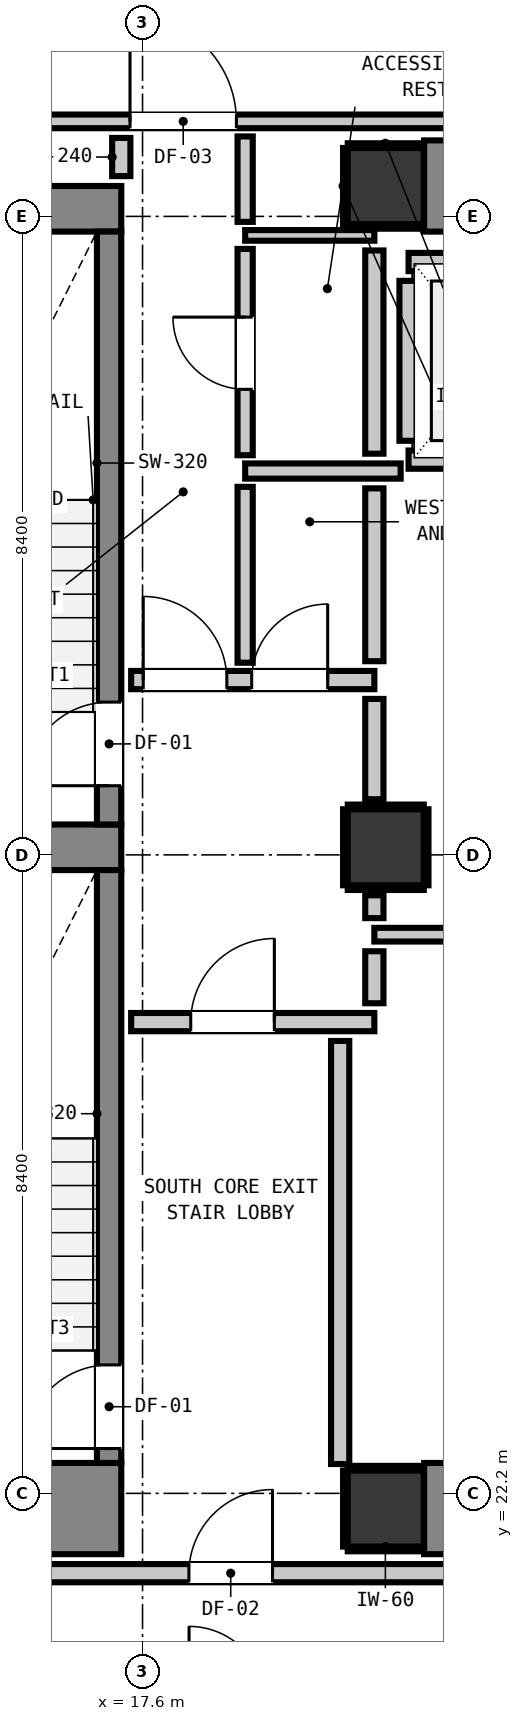
"""IFC4 building model, lengths in metres.
Left out: names, types, materials, properties, quantities, classifications, styles, units other than length and angle.
Written with IfcOpenShell. Run it as: python <this file> out.ifc"""

import sys

from ifc_helpers import new_model, si_unit, direction, frame, frame_2d, origin, origin_2d, place, context, subcontext, project, spatial, rectangle, extrude, element, fill, save


model = new_model("IFC4")
c1 = context("Model", 3, precision=1e-05, world=origin(), true_north=direction((0.0, 1.0)))
c2 = subcontext(c1, "Body", "Model", "MODEL_VIEW")
j1 = project(units=[si_unit("LENGTHUNIT", "METRE"), si_unit("PLANEANGLEUNIT", "RADIAN")], contexts=[c1])
p1 = place(None, origin())
s1 = spatial("IfcSite", under=j1, at=p1, CompositionType="ELEMENT")
p2 = place(p1, origin())
s2 = spatial("IfcBuilding", under=s1, at=p2, CompositionType="ELEMENT")
p3 = place(p2, frame((0.0, 0.0, 78.44)))
s3 = spatial("IfcBuildingStorey", under=s2, at=p3, CompositionType="ELEMENT", Elevation=78.44)
for number, where, z_axis, x_axis in (
    (1, (20.8, 22.0, 0.0), (0.0, 0.0, 1.0), (1.0, 0.0, 0.0)),
    (2, (20.8, 39.4, 0.0), (0.0, 0.0, 1.0), (1.0, 0.0, 0.0)),
):
    element("IfcColumn", number, at=place(p3, frame(where, z_axis=z_axis, x_axis=x_axis)), inside=s3, PredefinedType="COLUMN", context=c2, shape_type="SweptSolid", body=[
        extrude(rectangle(XDim=1.0, YDim=1.0, at=origin_2d()), origin(), (0.0, 0.0, 1.0), 3.32),
    ])
p4 = place(p3, frame((13.24, 22.0, 0.0), z_axis=(0.0, 0.0, 1.0), x_axis=(1.0, 0.0, 0.0)))
e3 = element("IfcWall", 3, at=p4, inside=s3, PredefinedType="SHEAR", context=c2, shape_type="SweptSolid", body=[
    extrude(rectangle(XDim=4.08, YDim=1.2, at=frame_2d((2.04, 0.0))), origin(), (0.0, 0.0, 1.0), 3.32),
])
p5 = place(p3, frame((13.24, 39.1, 0.0), z_axis=(0.0, 0.0, 1.0), x_axis=(1.0, 0.0, 0.0)))
e4 = element("IfcWall", 4, at=p5, inside=s3, PredefinedType="SHEAR", context=c2, shape_type="SweptSolid", body=[
    extrude(rectangle(XDim=4.08, YDim=0.6, at=frame_2d((2.04, 0.0))), origin(), (0.0, 0.0, 1.0), 3.32),
])
p6 = place(p3, frame((13.905, 30.7, 0.0), z_axis=(0.0, 0.0, 1.0), x_axis=(1.0, 0.0, 0.0)))
e5 = element("IfcWall", 5, at=p6, inside=s3, PredefinedType="SHEAR", context=c2, shape_type="SweptSolid", body=[
    extrude(rectangle(XDim=3.415, YDim=0.6, at=frame_2d((1.708, 0.0))), origin(), (0.0, 0.0, 1.0), 3.32),
])
for number, where, z_axis, x_axis in (
    (6, (21.305, 22.0, 0.0), (0.0, 0.0, 1.0), (1.0, 0.0, 0.0)),
    (7, (21.305, 39.4, 0.0), (0.0, 0.0, 1.0), (1.0, 0.0, 0.0)),
):
    element("IfcWall", number, at=place(p3, frame(where, z_axis=z_axis, x_axis=x_axis)), inside=s3, PredefinedType="SHEAR", context=c2, shape_type="SweptSolid", body=[
        extrude(rectangle(XDim=7.39, YDim=1.2, at=frame_2d((3.695, 0.0))), origin(), (0.0, 0.0, 1.0), 3.32),
    ])
p7 = place(p3, frame((17.16, 31.0, 0.0), z_axis=(0.0, 0.0, 1.0), x_axis=(0.0, 1.0, 0.0)))
e8 = element("IfcWall", 8, at=p7, inside=s3, PredefinedType="SHEAR", context=c2, shape_type="SweptSolid", body=[
    extrude(rectangle(XDim=7.8, YDim=0.32, at=frame_2d((3.9, 0.0))), origin(), (0.0, 0.0, 1.0), 3.32),
])
p8 = place(p7, frame((0.51, 0.0, 0.0)))
e9 = element("IfcOpeningElement", 9, at=p8, cuts=e8, PredefinedType="OPENING", context=c2, shape_type="SweptSolid", body=[
    extrude(rectangle(XDim=1.1, YDim=2.15, at=frame_2d((0.55, 1.075))), frame((0.0, 0.17, 0.0), z_axis=(0.0, -1.0, 0.0), x_axis=(1.0, 0.0, 0.0)), (0.0, 0.0, 1.0), 0.34),
])
p9 = place(p3, frame((17.16, 22.6, 0.0), z_axis=(0.0, 0.0, 1.0), x_axis=(0.0, 1.0, 0.0)))
e10 = element("IfcWall", 10, at=p9, inside=s3, PredefinedType="SHEAR", context=c2, shape_type="SweptSolid", body=[
    extrude(rectangle(XDim=7.8, YDim=0.32, at=frame_2d((3.9, 0.0))), origin(), (0.0, 0.0, 1.0), 3.32),
])
p10 = place(p9, frame((0.19, 0.0, 0.0)))
e11 = element("IfcOpeningElement", 11, at=p10, cuts=e10, PredefinedType="OPENING", context=c2, shape_type="SweptSolid", body=[
    extrude(rectangle(XDim=1.1, YDim=2.15, at=frame_2d((0.55, 1.075))), frame((0.0, 0.17, 0.0), z_axis=(0.0, -1.0, 0.0), x_axis=(1.0, 0.0, 0.0)), (0.0, 0.0, 1.0), 0.34),
])
p11 = place(p3, frame((20.8, 30.7, 0.0), z_axis=(0.0, 0.0, 1.0), x_axis=(1.0, 0.0, 0.0)))
e12 = element("IfcColumn", 12, at=p11, inside=s3, PredefinedType="COLUMN", context=c2, shape_type="SweptSolid", body=[
    extrude(rectangle(XDim=1.0, YDim=1.0, at=origin_2d()), origin(), (0.0, 0.0, 1.0), 3.32),
])
for number, where, z_axis, x_axis in (
    (13, (21.1, 35.8, 0.0), (0.0, 0.0, 1.0), (1.0, 0.0, 0.0)),
    (14, (21.1, 38.4, 0.0), (0.0, 0.0, 1.0), (1.0, 0.0, 0.0)),
):
    element("IfcWall", number, at=place(p3, frame(where, z_axis=z_axis, x_axis=x_axis)), inside=s3, PredefinedType="PARTITIONING", context=c2, shape_type="SweptSolid", body=[
        extrude(rectangle(XDim=2.2, YDim=0.24, at=frame_2d((1.1, 0.0))), origin(), (0.0, 0.0, 1.0), 2.9),
    ])
p12 = place(p3, frame((21.1, 36.048, 0.0), z_axis=(0.0, 0.0, 1.0), x_axis=(0.0, 1.0, 0.0)))
e15 = element("IfcWall", 15, at=p12, inside=s3, PredefinedType="PARTITIONING", context=c2, shape_type="SweptSolid", body=[
    extrude(rectangle(XDim=2.104, YDim=0.24, at=frame_2d((1.052, 0.0))), origin(), (0.0, 0.0, 1.0), 0.905),
])
p13 = place(p3, frame((8.027, 21.15, 0.0), z_axis=(0.0, 0.0, 1.0), x_axis=(1.0, 0.0, 0.0)))
e16 = element("IfcWall", 16, at=p13, inside=s3, PredefinedType="PARTITIONING", context=c2, shape_type="SweptSolid", body=[
    extrude(rectangle(XDim=42.146, YDim=0.24, at=frame_2d((21.073, 0.0))), origin(), (0.0, 0.0, 1.0), 2.9),
])
p14 = place(p13, frame((10.183, 0.0, 0.0)))
e17 = element("IfcOpeningElement", 17, at=p14, cuts=e16, PredefinedType="OPENING", context=c2, shape_type="SweptSolid", body=[
    extrude(rectangle(XDim=1.1, YDim=2.15, at=frame_2d((0.55, 1.075))), frame((0.0, 0.13, 0.0), z_axis=(0.0, -1.0, 0.0), x_axis=(1.0, 0.0, 0.0)), (0.0, 0.0, 1.0), 0.26),
])
p15 = place(p13, frame((2.447, 0.0, 0.0)))
e18 = element("IfcOpeningElement", 18, at=p15, cuts=e16, PredefinedType="OPENING", context=c2, shape_type="SweptSolid", body=[
    extrude(rectangle(XDim=1.4, YDim=2.15, at=frame_2d((0.7, 1.075))), frame((0.0, 0.13, 0.0), z_axis=(0.0, -1.0, 0.0), x_axis=(1.0, 0.0, 0.0)), (0.0, 0.0, 1.0), 0.26),
])
p16 = place(p13, frame((33.948, 0.0, 0.0)))
e19 = element("IfcOpeningElement", 19, at=p16, cuts=e16, PredefinedType="OPENING", context=c2, shape_type="SweptSolid", body=[
    extrude(rectangle(XDim=1.0, YDim=2.15, at=frame_2d((0.5, 1.075))), frame((0.0, 0.13, 0.0), z_axis=(0.0, -1.0, 0.0), x_axis=(1.0, 0.0, 0.0)), (0.0, 0.0, 1.0), 0.26),
])
p17 = place(p3, frame((17.45, 28.4, 0.0), z_axis=(0.0, 0.0, 1.0), x_axis=(1.0, 0.0, 0.0)))
e20 = element("IfcWall", 20, at=p17, inside=s3, PredefinedType="PARTITIONING", context=c2, shape_type="SweptSolid", body=[
    extrude(rectangle(XDim=3.2, YDim=0.24, at=frame_2d((1.6, 0.0))), origin(), (0.0, 0.0, 1.0), 2.9),
])
p18 = place(p17, frame((0.784, 0.0, 0.0)))
e21 = element("IfcOpeningElement", 21, at=p18, cuts=e20, PredefinedType="OPENING", context=c2, shape_type="SweptSolid", body=[
    extrude(rectangle(XDim=1.1, YDim=2.15, at=frame_2d((0.55, 1.075))), frame((0.0, 0.13, 0.0), z_axis=(0.0, -1.0, 0.0), x_axis=(1.0, 0.0, 0.0)), (0.0, 0.0, 1.0), 0.26),
])
p19 = place(p3, frame((17.45, 32.9, 0.0), z_axis=(0.0, 0.0, 1.0), x_axis=(1.0, 0.0, 0.0)))
e22 = element("IfcWall", 22, at=p19, inside=s3, PredefinedType="PARTITIONING", context=c2, shape_type="SweptSolid", body=[
    extrude(rectangle(XDim=3.2, YDim=0.24, at=frame_2d((1.6, 0.0))), origin(), (0.0, 0.0, 1.0), 2.9),
])
p20 = place(p19, frame((0.159, 0.0, 0.0)))
e23 = element("IfcOpeningElement", 23, at=p20, cuts=e22, PredefinedType="OPENING", context=c2, shape_type="SweptSolid", body=[
    extrude(rectangle(XDim=1.1, YDim=2.15, at=frame_2d((0.55, 1.075))), frame((0.0, 0.13, 0.0), z_axis=(0.0, -1.0, 0.0), x_axis=(1.0, 0.0, 0.0)), (0.0, 0.0, 1.0), 0.26),
])
p21 = place(p19, frame((1.586, 0.0, 0.0)))
e24 = element("IfcOpeningElement", 24, at=p21, cuts=e22, PredefinedType="OPENING", context=c2, shape_type="SweptSolid", body=[
    extrude(rectangle(XDim=1.0, YDim=2.15, at=frame_2d((0.5, 1.075))), frame((0.0, 0.13, 0.0), z_axis=(0.0, -1.0, 0.0), x_axis=(1.0, 0.0, 0.0)), (0.0, 0.0, 1.0), 0.26),
])
p22 = place(p3, frame((18.95, 35.65, 0.0), z_axis=(0.0, 0.0, 1.0), x_axis=(1.0, 0.0, 0.0)))
e25 = element("IfcWall", 25, at=p22, inside=s3, PredefinedType="PARTITIONING", context=c2, shape_type="SweptSolid", body=[
    extrude(rectangle(XDim=2.046, YDim=0.2, at=frame_2d((1.023, 0.0))), origin(), (0.0, 0.0, 1.0), 2.9),
])
p23 = place(p3, frame((20.65, 29.55, 0.0), z_axis=(0.0, 0.0, 1.0), x_axis=(1.0, 0.0, 0.0)))
e26 = element("IfcWall", 26, at=p23, inside=s3, PredefinedType="PARTITIONING", context=c2, shape_type="SweptSolid", body=[
    extrude(rectangle(XDim=9.325, YDim=0.18, at=frame_2d((4.663, 0.0))), origin(), (0.0, 0.0, 1.0), 2.9),
])
p24 = place(p3, frame((8.027, 40.25, 0.0), z_axis=(0.0, 0.0, 1.0), x_axis=(1.0, 0.0, 0.0)))
e27 = element("IfcWall", 27, at=p24, inside=s3, PredefinedType="PARTITIONING", context=c2, shape_type="SweptSolid", body=[
    extrude(rectangle(XDim=42.146, YDim=0.18, at=frame_2d((21.073, 0.0))), origin(), (0.0, 0.0, 1.0), 2.9),
])
p25 = place(p24, frame((9.408, 0.0, 0.0)))
e28 = element("IfcOpeningElement", 28, at=p25, cuts=e27, PredefinedType="OPENING", context=c2, shape_type="SweptSolid", body=[
    extrude(rectangle(XDim=1.4, YDim=2.15, at=frame_2d((0.7, 1.075))), frame((0.0, 0.1, 0.0), z_axis=(0.0, -1.0, 0.0), x_axis=(1.0, 0.0, 0.0)), (0.0, 0.0, 1.0), 0.2),
])
p26 = place(p24, frame((2.447, 0.0, 0.0)))
e29 = element("IfcOpeningElement", 29, at=p26, cuts=e27, PredefinedType="OPENING", context=c2, shape_type="SweptSolid", body=[
    extrude(rectangle(XDim=1.4, YDim=2.15, at=frame_2d((0.7, 1.075))), frame((0.0, 0.1, 0.0), z_axis=(0.0, -1.0, 0.0), x_axis=(1.0, 0.0, 0.0)), (0.0, 0.0, 1.0), 0.2),
])
p27 = place(p24, frame((35.474, 0.0, 0.0)))
e30 = element("IfcOpeningElement", 30, at=p27, cuts=e27, PredefinedType="OPENING", context=c2, shape_type="SweptSolid", body=[
    extrude(rectangle(XDim=0.9, YDim=2.1, at=frame_2d((0.45, 1.05))), frame((0.0, 0.1, 0.0), z_axis=(0.0, -1.0, 0.0), x_axis=(1.0, 0.0, 0.0)), (0.0, 0.0, 1.0), 0.2),
])
p28 = place(p3, frame((18.95, 38.75, 0.0), z_axis=(0.0, 0.0, 1.0), x_axis=(1.0, 0.0, 0.0)))
e31 = element("IfcWall", 31, at=p28, inside=s3, PredefinedType="PARTITIONING", context=c2, shape_type="SweptSolid", body=[
    extrude(rectangle(XDim=1.7, YDim=0.14, at=frame_2d((0.85, 0.0))), origin(), (0.0, 0.0, 1.0), 0.905),
])
p29 = place(p3, frame((17.32, 39.53, 0.0), z_axis=(0.0, 0.0, 1.0), x_axis=(0.0, 1.0, 0.0)))
e32 = element("IfcWall", 32, at=p29, inside=s3, PredefinedType="PARTITIONING", context=c2, shape_type="SweptSolid", body=[
    extrude(rectangle(XDim=0.502, YDim=0.24, at=frame_2d((0.251, 0.0))), origin(), (0.0, 0.0, 1.0), 2.9),
])
p30 = place(p3, frame((20.2, 22.586, 0.0), z_axis=(0.0, 0.0, 1.0), x_axis=(0.0, 1.0, 0.0)))
e33 = element("IfcWall", 33, at=p30, inside=s3, PredefinedType="PARTITIONING", context=c2, shape_type="SweptSolid", body=[
    extrude(rectangle(XDim=5.566, YDim=0.24, at=frame_2d((2.783, 0.0))), origin(), (0.0, 0.0, 1.0), 0.905),
])
p31 = place(p3, frame((20.65, 28.648, 0.0), z_axis=(0.0, 0.0, 1.0), x_axis=(0.0, 1.0, 0.0)))
e34 = element("IfcWall", 34, at=p31, inside=s3, PredefinedType="PARTITIONING", context=c2, shape_type="SweptSolid", body=[
    extrude(rectangle(XDim=0.684, YDim=0.24, at=frame_2d((0.342, 0.0))), origin(), (0.0, 0.0, 1.0), 0.905),
])
p32 = place(p3, frame((20.65, 29.768, 0.0), z_axis=(0.0, 0.0, 1.0), x_axis=(0.0, 1.0, 0.0)))
e35 = element("IfcWall", 35, at=p32, inside=s3, PredefinedType="PARTITIONING", context=c2, shape_type="SweptSolid", body=[
    extrude(rectangle(XDim=0.3, YDim=0.24, at=frame_2d((0.15, 0.0))), origin(), (0.0, 0.0, 1.0), 0.905),
])
p33 = place(p3, frame((20.65, 31.332, 0.0), z_axis=(0.0, 0.0, 1.0), x_axis=(0.0, 1.0, 0.0)))
e36 = element("IfcWall", 36, at=p33, inside=s3, PredefinedType="PARTITIONING", context=c2, shape_type="SweptSolid", body=[
    extrude(rectangle(XDim=1.32, YDim=0.24, at=frame_2d((0.66, 0.0))), origin(), (0.0, 0.0, 1.0), 0.905),
])
p34 = place(p3, frame((20.65, 33.148, 0.0), z_axis=(0.0, 0.0, 1.0), x_axis=(0.0, 1.0, 0.0)))
e37 = element("IfcWall", 37, at=p34, inside=s3, PredefinedType="PARTITIONING", context=c2, shape_type="SweptSolid", body=[
    extrude(rectangle(XDim=2.274, YDim=0.24, at=frame_2d((1.137, 0.0))), origin(), (0.0, 0.0, 1.0), 0.905),
])
p35 = place(p3, frame((20.65, 35.878, 0.0), z_axis=(0.0, 0.0, 1.0), x_axis=(0.0, 1.0, 0.0)))
e38 = element("IfcWall", 38, at=p35, inside=s3, PredefinedType="PARTITIONING", context=c2, shape_type="SweptSolid", body=[
    extrude(rectangle(XDim=2.674, YDim=0.24, at=frame_2d((1.337, 0.0))), origin(), (0.0, 0.0, 1.0), 0.905),
])
p36 = place(p3, frame((18.95, 33.128, 0.0), z_axis=(0.0, 0.0, 1.0), x_axis=(0.0, 1.0, 0.0)))
e39 = element("IfcWall", 39, at=p36, inside=s3, PredefinedType="PARTITIONING", context=c2, shape_type="SweptSolid", body=[
    extrude(rectangle(XDim=2.314, YDim=0.2, at=frame_2d((1.157, 0.0))), origin(), (0.0, 0.0, 1.0), 2.9),
])
p37 = place(p3, frame((18.95, 35.858, 0.0), z_axis=(0.0, 0.0, 1.0), x_axis=(0.0, 1.0, 0.0)))
e40 = element("IfcWall", 40, at=p37, inside=s3, PredefinedType="PARTITIONING", context=c2, shape_type="SweptSolid", body=[
    extrude(rectangle(XDim=2.714, YDim=0.2, at=frame_2d((1.357, 0.0))), origin(), (0.0, 0.0, 1.0), 2.9),
])
p38 = place(p37, frame((0.867, 0.0, 0.0)))
e41 = element("IfcOpeningElement", 41, at=p38, cuts=e40, PredefinedType="OPENING", context=c2, shape_type="SweptSolid", body=[
    extrude(rectangle(XDim=0.95, YDim=2.1, at=frame_2d((0.475, 1.05))), frame((0.0, 0.11, 0.0), z_axis=(0.0, -1.0, 0.0), x_axis=(1.0, 0.0, 0.0)), (0.0, 0.0, 1.0), 0.22),
])
p39 = place(p3, frame((18.95, 38.928, 0.0), z_axis=(0.0, 0.0, 1.0), x_axis=(0.0, 1.0, 0.0)))
e42 = element("IfcWall", 42, at=p39, inside=s3, PredefinedType="PARTITIONING", context=c2, shape_type="SweptSolid", body=[
    extrude(rectangle(XDim=1.124, YDim=0.2, at=frame_2d((0.562, 0.0))), origin(), (0.0, 0.0, 1.0), 2.9),
])
for number, where, z_axis, x_axis in (
    (43, (20.3, 21.468, 0.0), (0.0, 0.0, 1.0), (1.0, 0.0, 0.0)),
    (44, (20.3, 22.532, 0.0), (0.0, 0.0, 1.0), (1.0, 0.0, 0.0)),
):
    element("IfcWall", number, at=place(p3, frame(where, z_axis=z_axis, x_axis=x_axis)), inside=s3, PredefinedType="PARTITIONING", context=c2, shape_type="SweptSolid", body=[
        extrude(rectangle(XDim=0.99, YDim=0.06, at=frame_2d((0.495, 0.0))), origin(), (0.0, 0.0, 1.0), 0.905),
    ])
p40 = place(p3, frame((20.268, 21.5, 0.0), z_axis=(0.0, 0.0, 1.0), x_axis=(0.0, 1.0, 0.0)))
e45 = element("IfcWall", 45, at=p40, inside=s3, PredefinedType="PARTITIONING", context=c2, shape_type="SweptSolid", body=[
    extrude(rectangle(XDim=1.0, YDim=0.06, at=frame_2d((0.5, 0.0))), origin(), (0.0, 0.0, 1.0), 0.905),
])
for number, where, z_axis, x_axis in (
    (46, (20.3, 38.868, 0.0), (0.0, 0.0, 1.0), (1.0, 0.0, 0.0)),
    (47, (20.3, 39.932, 0.0), (0.0, 0.0, 1.0), (1.0, 0.0, 0.0)),
):
    element("IfcWall", number, at=place(p3, frame(where, z_axis=z_axis, x_axis=x_axis)), inside=s3, PredefinedType="PARTITIONING", context=c2, shape_type="SweptSolid", body=[
        extrude(rectangle(XDim=0.99, YDim=0.06, at=frame_2d((0.495, 0.0))), origin(), (0.0, 0.0, 1.0), 0.905),
    ])
for number, where, z_axis, x_axis in (
    (48, (20.268, 38.9, 0.0), (0.0, 0.0, 1.0), (0.0, 1.0, 0.0)),
    (49, (20.3, 30.168, 0.0), (0.0, 0.0, 1.0), (1.0, 0.0, 0.0)),
    (50, (20.3, 31.232, 0.0), (0.0, 0.0, 1.0), (1.0, 0.0, 0.0)),
    (51, (20.268, 30.2, 0.0), (0.0, 0.0, 1.0), (0.0, 1.0, 0.0)),
    (52, (21.332, 30.2, 0.0), (0.0, 0.0, 1.0), (0.0, 1.0, 0.0)),
):
    element("IfcWall", number, at=place(p3, frame(where, z_axis=z_axis, x_axis=x_axis)), inside=s3, PredefinedType="PARTITIONING", context=c2, shape_type="SweptSolid", body=[
        extrude(rectangle(XDim=1.0, YDim=0.06, at=frame_2d((0.5, 0.0))), origin(), (0.0, 0.0, 1.0), 0.905),
    ])
p41 = place(p8, origin())
e53 = element("IfcDoor", 53, at=p41, inside=s3, OperationType="SINGLE_SWING_LEFT", PredefinedType="DOOR", context=c2, shape_type="SweptSolid", body=[
    extrude(rectangle(XDim=1.1, YDim=2.15, at=frame_2d((0.55, 1.075))), frame((0.0, 0.025, 0.0), z_axis=(0.0, -1.0, 0.0), x_axis=(1.0, 0.0, 0.0)), (0.0, 0.0, 1.0), 0.05),
])
fill(e9, e53)
p42 = place(p10, origin())
e54 = element("IfcDoor", 54, at=p42, inside=s3, OperationType="SINGLE_SWING_LEFT", PredefinedType="DOOR", context=c2, shape_type="SweptSolid", body=[
    extrude(rectangle(XDim=1.1, YDim=2.15, at=frame_2d((0.55, 1.075))), frame((0.0, 0.025, 0.0), z_axis=(0.0, -1.0, 0.0), x_axis=(1.0, 0.0, 0.0)), (0.0, 0.0, 1.0), 0.05),
])
fill(e11, e54)
p43 = place(p18, origin())
e55 = element("IfcDoor", 55, at=p43, inside=s3, OperationType="SINGLE_SWING_RIGHT", PredefinedType="DOOR", context=c2, shape_type="SweptSolid", body=[
    extrude(rectangle(XDim=1.1, YDim=2.15, at=frame_2d((0.55, 1.075))), frame((0.0, 0.025, 0.0), z_axis=(0.0, -1.0, 0.0), x_axis=(1.0, 0.0, 0.0)), (0.0, 0.0, 1.0), 0.05),
])
fill(e21, e55)
p44 = place(p20, origin())
e56 = element("IfcDoor", 56, at=p44, inside=s3, OperationType="SINGLE_SWING_LEFT", PredefinedType="DOOR", context=c2, shape_type="SweptSolid", body=[
    extrude(rectangle(XDim=1.1, YDim=2.15, at=frame_2d((0.55, 1.075))), frame((0.0, 0.025, 0.0), z_axis=(0.0, -1.0, 0.0), x_axis=(1.0, 0.0, 0.0)), (0.0, 0.0, 1.0), 0.05),
])
fill(e23, e56)
p45 = place(p14, origin())
e57 = element("IfcDoor", 57, at=p45, inside=s3, OperationType="SINGLE_SWING_RIGHT", PredefinedType="DOOR", context=c2, shape_type="SweptSolid", body=[
    extrude(rectangle(XDim=1.1, YDim=2.15, at=frame_2d((0.55, 1.075))), frame((0.0, 0.025, 0.0), z_axis=(0.0, -1.0, 0.0), x_axis=(1.0, 0.0, 0.0)), (0.0, 0.0, 1.0), 0.05),
])
fill(e17, e57)
p46 = place(p25, origin())
e58 = element("IfcDoor", 58, at=p46, inside=s3, OperationType="SINGLE_SWING_LEFT", PredefinedType="DOOR", context=c2, shape_type="SweptSolid", body=[
    extrude(rectangle(XDim=1.4, YDim=2.15, at=frame_2d((0.7, 1.075))), frame((0.0, 0.025, 0.0), z_axis=(0.0, -1.0, 0.0), x_axis=(1.0, 0.0, 0.0)), (0.0, 0.0, 1.0), 0.05),
])
fill(e28, e58)
p47 = place(p21, origin())
e59 = element("IfcDoor", 59, at=p47, inside=s3, OperationType="SINGLE_SWING_RIGHT", PredefinedType="DOOR", context=c2, shape_type="SweptSolid", body=[
    extrude(rectangle(XDim=1.0, YDim=2.15, at=frame_2d((0.5, 1.075))), frame((0.0, 0.025, 0.0), z_axis=(0.0, -1.0, 0.0), x_axis=(1.0, 0.0, 0.0)), (0.0, 0.0, 1.0), 0.05),
])
fill(e24, e59)
p48 = place(p38, origin())
e60 = element("IfcDoor", 60, at=p48, inside=s3, OperationType="SINGLE_SWING_RIGHT", PredefinedType="DOOR", context=c2, shape_type="SweptSolid", body=[
    extrude(rectangle(XDim=0.95, YDim=2.1, at=frame_2d((0.475, 1.05))), frame((0.0, 0.025, 0.0), z_axis=(0.0, -1.0, 0.0), x_axis=(1.0, 0.0, 0.0)), (0.0, 0.0, 1.0), 0.05),
])
fill(e41, e60)
save(model, sys.argv[1])
